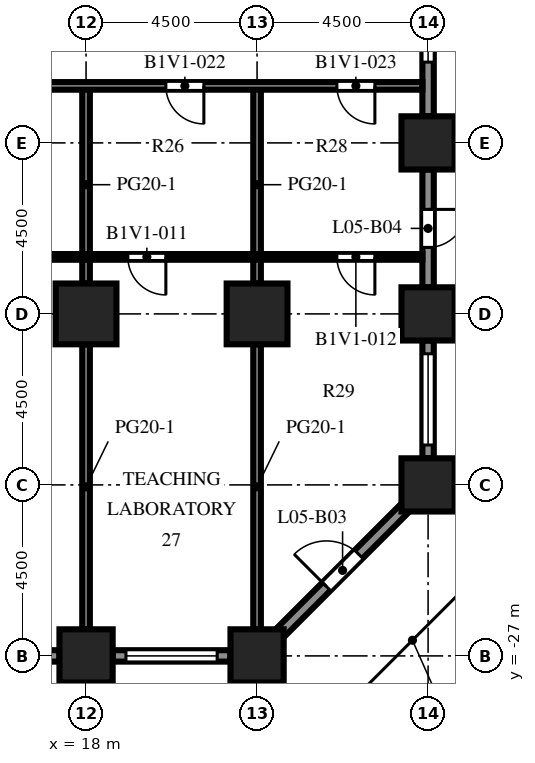
"""IFC4 building model, lengths in metres.
Left out: names, types, materials, properties, quantities, classifications, styles, units other than length and angle.
Written with IfcOpenShell. Run it as: python <this file> out.ifc"""

import sys

from ifc_helpers import new_model, si_unit, direction, frame, frame_2d, origin, origin_2d, place, context, subcontext, project, spatial, rectangle, extrude, element, fill, save


model = new_model("IFC4")
c1 = context("Model", 3, precision=1e-05, world=origin(), true_north=direction((0.0, 1.0)))
c2 = subcontext(c1, "Body", "Model", "MODEL_VIEW")
j1 = project(units=[si_unit("LENGTHUNIT", "METRE"), si_unit("PLANEANGLEUNIT", "RADIAN")], contexts=[c1])
p1 = place(None, origin())
s1 = spatial("IfcSite", under=j1, at=p1, CompositionType="ELEMENT")
p2 = place(p1, origin())
s2 = spatial("IfcBuilding", under=s1, at=p2, CompositionType="ELEMENT")
p3 = place(p2, frame((0.0, 0.0, 23.6)))
s3 = spatial("IfcBuildingStorey", under=s2, at=p3, CompositionType="ELEMENT", Elevation=23.6)
for number, where, z_axis, x_axis in (
    (1, (18.0, -27.0, 0.0), (0.0, 0.0, 1.0), (1.0, 0.0, 0.0)),
    (2, (22.5, -27.0, 0.0), (0.0, 0.0, 1.0), (1.0, 0.0, 0.0)),
    (3, (27.0, -22.5, 0.0), (0.0, 0.0, 1.0), (1.0, 0.0, 0.0)),
    (4, (27.0, -18.0, 0.0), (0.0, 0.0, 1.0), (1.0, 0.0, 0.0)),
    (5, (27.0, -13.5, 0.0), (0.0, 0.0, 1.0), (1.0, 0.0, 0.0)),
):
    element("IfcColumn", number, at=place(p3, frame(where, z_axis=z_axis, x_axis=x_axis)), inside=s3, PredefinedType="COLUMN", context=c2, shape_type="SweptSolid", body=[
        extrude(rectangle(XDim=1.4, YDim=1.4, at=origin_2d()), origin(), (0.0, 0.0, 1.0), 4.1),
    ])
for number, where, z_axis, x_axis in (
    (6, (18.0, -18.0, 0.0), (0.0, 0.0, 1.0), (1.0, 0.0, 0.0)),
    (7, (22.5, -18.0, 0.0), (0.0, 0.0, 1.0), (1.0, 0.0, 0.0)),
):
    element("IfcColumn", number, at=place(p3, frame(where, z_axis=z_axis, x_axis=x_axis)), inside=s3, PredefinedType="COLUMN", context=c2, shape_type="SweptSolid", body=[
        extrude(rectangle(XDim=1.6, YDim=1.6, at=origin_2d()), origin(), (0.0, 0.0, 1.0), 4.1),
    ])
p4 = place(p3, frame((17.3, -27.0, 0.0), z_axis=(0.0, 0.0, 1.0), x_axis=(-1.0, 0.0, 0.0)))
e8 = element("IfcWall", 8, at=p4, inside=s3, PredefinedType="SOLIDWALL", context=c2, shape_type="SweptSolid", body=[
    extrude(rectangle(XDim=3.1, YDim=0.3, at=frame_2d((1.55, 0.0))), origin(), (0.0, 0.0, 1.0), 2.75),
])
p5 = place(p4, frame((1.05, 0.0, 0.0)))
e9 = element("IfcOpeningElement", 9, at=p5, cuts=e8, PredefinedType="OPENING", context=c2, shape_type="SweptSolid", body=[
    extrude(rectangle(XDim=1.0, YDim=2.2, at=frame_2d((0.5, 1.1))), frame((0.0, 0.16, 0.0), z_axis=(0.0, -1.0, 0.0), x_axis=(1.0, 0.0, 0.0)), (0.0, 0.0, 1.0), 0.32),
])
p6 = place(p3, frame((21.8, -27.0, 0.0), z_axis=(0.0, 0.0, 1.0), x_axis=(-1.0, 0.0, 0.0)))
e10 = element("IfcWall", 10, at=p6, inside=s3, PredefinedType="SOLIDWALL", context=c2, shape_type="SweptSolid", body=[
    extrude(rectangle(XDim=3.1, YDim=0.3, at=frame_2d((1.55, 0.0))), origin(), (0.0, 0.0, 1.0), 2.75),
])
p7 = place(p6, frame((0.35, 0.0, 0.8)))
e11 = element("IfcOpeningElement", 11, at=p7, cuts=e10, PredefinedType="OPENING", context=c2, shape_type="SweptSolid", body=[
    extrude(rectangle(XDim=2.4, YDim=1.7, at=frame_2d((1.2, 0.85))), frame((0.0, 0.16, 0.0), z_axis=(0.0, -1.0, 0.0), x_axis=(1.0, 0.0, 0.0)), (0.0, 0.0, 1.0), 0.32),
])
p8 = place(p3, frame((26.406, -23.094, 0.0), z_axis=(0.0, 0.0, 1.0), x_axis=(-0.707106781187, -0.707106781187, 0.0)))
e12 = element("IfcWall", 12, at=p8, inside=s3, PredefinedType="SOLIDWALL", context=c2, shape_type="SweptSolid", body=[
    extrude(rectangle(XDim=4.684, YDim=0.3, at=frame_2d((2.342, 0.0))), origin(), (0.0, 0.0, 1.0), 2.75),
])
p9 = place(p8, frame((1.742, 0.0, 0.0)))
e13 = element("IfcOpeningElement", 13, at=p9, cuts=e12, PredefinedType="OPENING", context=c2, shape_type="SweptSolid", body=[
    extrude(rectangle(XDim=1.2, YDim=2.2, at=frame_2d((0.6, 1.1))), frame((0.0, 0.16, 0.0), z_axis=(0.0, -1.0, 0.0), x_axis=(1.0, 0.0, 0.0)), (0.0, 0.0, 1.0), 0.32),
])
p10 = place(p3, frame((27.0, -18.7, 0.0), z_axis=(0.0, 0.0, 1.0), x_axis=(0.0, -1.0, 0.0)))
e14 = element("IfcWall", 14, at=p10, inside=s3, PredefinedType="SOLIDWALL", context=c2, shape_type="SweptSolid", body=[
    extrude(rectangle(XDim=3.1, YDim=0.3, at=frame_2d((1.55, 0.0))), origin(), (0.0, 0.0, 1.0), 2.75),
])
p11 = place(p10, frame((0.35, 0.0, 0.8)))
e15 = element("IfcOpeningElement", 15, at=p11, cuts=e14, PredefinedType="OPENING", context=c2, shape_type="SweptSolid", body=[
    extrude(rectangle(XDim=2.4, YDim=1.7, at=frame_2d((1.2, 0.85))), frame((0.0, 0.16, 0.0), z_axis=(0.0, -1.0, 0.0), x_axis=(1.0, 0.0, 0.0)), (0.0, 0.0, 1.0), 0.32),
])
p12 = place(p3, frame((27.0, -14.2, 0.0), z_axis=(0.0, 0.0, 1.0), x_axis=(0.0, -1.0, 0.0)))
e16 = element("IfcWall", 16, at=p12, inside=s3, PredefinedType="SOLIDWALL", context=c2, shape_type="SweptSolid", body=[
    extrude(rectangle(XDim=3.1, YDim=0.3, at=frame_2d((1.55, 0.0))), origin(), (0.0, 0.0, 1.0), 2.75),
])
p13 = place(p12, frame((1.05, 0.0, 0.0)))
e17 = element("IfcOpeningElement", 17, at=p13, cuts=e16, PredefinedType="OPENING", context=c2, shape_type="SweptSolid", body=[
    extrude(rectangle(XDim=1.0, YDim=2.2, at=frame_2d((0.5, 1.1))), frame((0.0, 0.16, 0.0), z_axis=(0.0, -1.0, 0.0), x_axis=(1.0, 0.0, 0.0)), (0.0, 0.0, 1.0), 0.32),
])
p14 = place(p3, frame((27.0, -9.7, 0.0), z_axis=(0.0, 0.0, 1.0), x_axis=(0.0, -1.0, 0.0)))
e18 = element("IfcWall", 18, at=p14, inside=s3, PredefinedType="SOLIDWALL", context=c2, shape_type="SweptSolid", body=[
    extrude(rectangle(XDim=3.1, YDim=0.3, at=frame_2d((1.55, 0.0))), origin(), (0.0, 0.0, 1.0), 2.75),
])
p15 = place(p14, frame((0.475, 0.0, 0.8)))
e19 = element("IfcOpeningElement", 19, at=p15, cuts=e18, PredefinedType="OPENING", context=c2, shape_type="SweptSolid", body=[
    extrude(rectangle(XDim=1.2, YDim=1.7, at=frame_2d((0.6, 0.85))), frame((0.0, 0.16, 0.0), z_axis=(0.0, -1.0, 0.0), x_axis=(1.0, 0.0, 0.0)), (0.0, 0.0, 1.0), 0.32),
])
p16 = place(p3, frame((18.0, -26.3, 0.0), z_axis=(0.0, 0.0, 1.0), x_axis=(0.0, 1.0, 0.0)))
e20 = element("IfcWall", 20, at=p16, inside=s3, PredefinedType="PARTITIONING", context=c2, shape_type="SweptSolid", body=[
    extrude(rectangle(XDim=7.5, YDim=0.2, at=frame_2d((3.75, 0.0))), origin(), (0.0, 0.0, 1.0), 3.65),
])
p17 = place(p3, frame((18.0, -17.2, 0.0), z_axis=(0.0, 0.0, 1.0), x_axis=(0.0, 1.0, 0.0)))
e21 = element("IfcWall", 21, at=p17, inside=s3, PredefinedType="PARTITIONING", context=c2, shape_type="SweptSolid", body=[
    extrude(rectangle(XDim=5.2, YDim=0.2, at=frame_2d((2.6, 0.0))), origin(), (0.0, 0.0, 1.0), 3.65),
])
p18 = place(p3, frame((22.5, -26.3, 0.0), z_axis=(0.0, 0.0, 1.0), x_axis=(0.0, 1.0, 0.0)))
e22 = element("IfcWall", 22, at=p18, inside=s3, PredefinedType="PARTITIONING", context=c2, shape_type="SweptSolid", body=[
    extrude(rectangle(XDim=7.5, YDim=0.2, at=frame_2d((3.75, 0.0))), origin(), (0.0, 0.0, 1.0), 3.65),
])
p19 = place(p3, frame((22.5, -17.2, 0.0), z_axis=(0.0, 0.0, 1.0), x_axis=(0.0, 1.0, 0.0)))
e23 = element("IfcWall", 23, at=p19, inside=s3, PredefinedType="PARTITIONING", context=c2, shape_type="SweptSolid", body=[
    extrude(rectangle(XDim=5.2, YDim=0.2, at=frame_2d((2.6, 0.0))), origin(), (0.0, 0.0, 1.0), 3.65),
])
p20 = place(p3, frame((26.85, -16.5, 0.0), z_axis=(0.0, 0.0, 1.0), x_axis=(-1.0, 0.0, 0.0)))
e24 = element("IfcWall", 24, at=p20, inside=s3, PredefinedType="PARTITIONING", context=c2, shape_type="SweptSolid", body=[
    extrude(rectangle(XDim=53.7, YDim=0.15, at=frame_2d((26.85, 0.0))), origin(), (0.0, 0.0, 1.0), 3.65),
])
p21 = place(p20, frame((50.75, 0.0, 0.0)))
e25 = element("IfcOpeningElement", 25, at=p21, cuts=e24, PredefinedType="OPENING", context=c2, shape_type="SweptSolid", body=[
    extrude(rectangle(XDim=1.0, YDim=2.1, at=frame_2d((0.5, 1.05))), frame((0.0, 0.085, 0.0), z_axis=(0.0, -1.0, 0.0), x_axis=(1.0, 0.0, 0.0)), (0.0, 0.0, 1.0), 0.17),
])
p22 = place(p20, frame((45.75, 0.0, 0.0)))
e26 = element("IfcOpeningElement", 26, at=p22, cuts=e24, PredefinedType="OPENING", context=c2, shape_type="SweptSolid", body=[
    extrude(rectangle(XDim=1.0, YDim=2.1, at=frame_2d((0.5, 1.05))), frame((0.0, 0.085, 0.0), z_axis=(0.0, -1.0, 0.0), x_axis=(1.0, 0.0, 0.0)), (0.0, 0.0, 1.0), 0.17),
])
p23 = place(p20, frame((37.75, 0.0, 0.0)))
e27 = element("IfcOpeningElement", 27, at=p23, cuts=e24, PredefinedType="OPENING", context=c2, shape_type="SweptSolid", body=[
    extrude(rectangle(XDim=1.0, YDim=2.1, at=frame_2d((0.5, 1.05))), frame((0.0, 0.085, 0.0), z_axis=(0.0, -1.0, 0.0), x_axis=(1.0, 0.0, 0.0)), (0.0, 0.0, 1.0), 0.17),
])
p24 = place(p20, frame((28.25, 0.0, 0.0)))
e28 = element("IfcOpeningElement", 28, at=p24, cuts=e24, PredefinedType="OPENING", context=c2, shape_type="SweptSolid", body=[
    extrude(rectangle(XDim=1.0, YDim=2.1, at=frame_2d((0.5, 1.05))), frame((0.0, 0.085, 0.0), z_axis=(0.0, -1.0, 0.0), x_axis=(1.0, 0.0, 0.0)), (0.0, 0.0, 1.0), 0.17),
])
p25 = place(p20, frame((19.75, 0.0, 0.0)))
e29 = element("IfcOpeningElement", 29, at=p25, cuts=e24, PredefinedType="OPENING", context=c2, shape_type="SweptSolid", body=[
    extrude(rectangle(XDim=1.0, YDim=2.1, at=frame_2d((0.5, 1.05))), frame((0.0, 0.085, 0.0), z_axis=(0.0, -1.0, 0.0), x_axis=(1.0, 0.0, 0.0)), (0.0, 0.0, 1.0), 0.17),
])
p26 = place(p20, frame((13.5, 0.0, 0.0)))
e30 = element("IfcOpeningElement", 30, at=p26, cuts=e24, PredefinedType="OPENING", context=c2, shape_type="SweptSolid", body=[
    extrude(rectangle(XDim=1.0, YDim=2.1, at=frame_2d((0.5, 1.05))), frame((0.0, 0.085, 0.0), z_axis=(0.0, -1.0, 0.0), x_axis=(1.0, 0.0, 0.0)), (0.0, 0.0, 1.0), 0.17),
])
p27 = place(p20, frame((6.75, 0.0, 0.0)))
e31 = element("IfcOpeningElement", 31, at=p27, cuts=e24, PredefinedType="OPENING", context=c2, shape_type="SweptSolid", body=[
    extrude(rectangle(XDim=1.0, YDim=2.1, at=frame_2d((0.5, 1.05))), frame((0.0, 0.085, 0.0), z_axis=(0.0, -1.0, 0.0), x_axis=(1.0, 0.0, 0.0)), (0.0, 0.0, 1.0), 0.17),
])
p28 = place(p20, frame((1.25, 0.0, 0.0)))
e32 = element("IfcOpeningElement", 32, at=p28, cuts=e24, PredefinedType="OPENING", context=c2, shape_type="SweptSolid", body=[
    extrude(rectangle(XDim=1.0, YDim=2.1, at=frame_2d((0.5, 1.05))), frame((0.0, 0.085, 0.0), z_axis=(0.0, -1.0, 0.0), x_axis=(1.0, 0.0, 0.0)), (0.0, 0.0, 1.0), 0.17),
])
p29 = place(p3, frame((26.85, -12.0, 0.0), z_axis=(0.0, 0.0, 1.0), x_axis=(-1.0, 0.0, 0.0)))
e33 = element("IfcWall", 33, at=p29, inside=s3, PredefinedType="PARTITIONING", context=c2, shape_type="SweptSolid", body=[
    extrude(rectangle(XDim=53.7, YDim=0.2, at=frame_2d((26.85, 0.0))), origin(), (0.0, 0.0, 1.0), 3.65),
])
p30 = place(p29, frame((51.5, 0.0, 0.0)))
e34 = element("IfcOpeningElement", 34, at=p30, cuts=e33, PredefinedType="OPENING", context=c2, shape_type="SweptSolid", body=[
    extrude(rectangle(XDim=1.0, YDim=2.1, at=frame_2d((0.5, 1.05))), frame((0.0, 0.11, 0.0), z_axis=(0.0, -1.0, 0.0), x_axis=(1.0, 0.0, 0.0)), (0.0, 0.0, 1.0), 0.22),
])
p31 = place(p29, frame((44.0, 0.0, 0.0)))
e35 = element("IfcOpeningElement", 35, at=p31, cuts=e33, PredefinedType="OPENING", context=c2, shape_type="SweptSolid", body=[
    extrude(rectangle(XDim=1.0, YDim=2.1, at=frame_2d((0.5, 1.05))), frame((0.0, 0.11, 0.0), z_axis=(0.0, -1.0, 0.0), x_axis=(1.0, 0.0, 0.0)), (0.0, 0.0, 1.0), 0.22),
])
p32 = place(p29, frame((37.25, 0.0, 0.0)))
e36 = element("IfcOpeningElement", 36, at=p32, cuts=e33, PredefinedType="OPENING", context=c2, shape_type="SweptSolid", body=[
    extrude(rectangle(XDim=1.0, YDim=2.1, at=frame_2d((0.5, 1.05))), frame((0.0, 0.11, 0.0), z_axis=(0.0, -1.0, 0.0), x_axis=(1.0, 0.0, 0.0)), (0.0, 0.0, 1.0), 0.22),
])
p33 = place(p29, frame((30.5, 0.0, 0.0)))
e37 = element("IfcOpeningElement", 37, at=p33, cuts=e33, PredefinedType="OPENING", context=c2, shape_type="SweptSolid", body=[
    extrude(rectangle(XDim=1.0, YDim=2.1, at=frame_2d((0.5, 1.05))), frame((0.0, 0.11, 0.0), z_axis=(0.0, -1.0, 0.0), x_axis=(1.0, 0.0, 0.0)), (0.0, 0.0, 1.0), 0.22),
])
p34 = place(p29, frame((20.0, 0.0, 0.0)))
e38 = element("IfcOpeningElement", 38, at=p34, cuts=e33, PredefinedType="OPENING", context=c2, shape_type="SweptSolid", body=[
    extrude(rectangle(XDim=1.0, YDim=2.1, at=frame_2d((0.5, 1.05))), frame((0.0, 0.11, 0.0), z_axis=(0.0, -1.0, 0.0), x_axis=(1.0, 0.0, 0.0)), (0.0, 0.0, 1.0), 0.22),
])
p35 = place(p29, frame((13.0, 0.0, 0.0)))
e39 = element("IfcOpeningElement", 39, at=p35, cuts=e33, PredefinedType="OPENING", context=c2, shape_type="SweptSolid", body=[
    extrude(rectangle(XDim=1.0, YDim=2.1, at=frame_2d((0.5, 1.05))), frame((0.0, 0.11, 0.0), z_axis=(0.0, -1.0, 0.0), x_axis=(1.0, 0.0, 0.0)), (0.0, 0.0, 1.0), 0.22),
])
p36 = place(p29, frame((5.75, 0.0, 0.0)))
e40 = element("IfcOpeningElement", 40, at=p36, cuts=e33, PredefinedType="OPENING", context=c2, shape_type="SweptSolid", body=[
    extrude(rectangle(XDim=1.0, YDim=2.1, at=frame_2d((0.5, 1.05))), frame((0.0, 0.11, 0.0), z_axis=(0.0, -1.0, 0.0), x_axis=(1.0, 0.0, 0.0)), (0.0, 0.0, 1.0), 0.22),
])
p37 = place(p29, frame((1.25, 0.0, 0.0)))
e41 = element("IfcOpeningElement", 41, at=p37, cuts=e33, PredefinedType="OPENING", context=c2, shape_type="SweptSolid", body=[
    extrude(rectangle(XDim=1.0, YDim=2.1, at=frame_2d((0.5, 1.05))), frame((0.0, 0.11, 0.0), z_axis=(0.0, -1.0, 0.0), x_axis=(1.0, 0.0, 0.0)), (0.0, 0.0, 1.0), 0.22),
])
p38 = place(p7, origin())
e42 = element("IfcWindow", 42, at=p38, inside=s3, PartitioningType="SINGLE_PANEL", PredefinedType="WINDOW", context=c2, shape_type="SweptSolid", body=[
    extrude(rectangle(XDim=2.4, YDim=1.7, at=frame_2d((1.2, 0.85))), frame((0.0, 0.03, 0.0), z_axis=(0.0, -1.0, 0.0), x_axis=(1.0, 0.0, 0.0)), (0.0, 0.0, 1.0), 0.06),
])
fill(e11, e42)
p39 = place(p9, origin())
e43 = element("IfcDoor", 43, at=p39, inside=s3, OperationType="SINGLE_SWING_RIGHT", PredefinedType="DOOR", context=c2, shape_type="SweptSolid", body=[
    extrude(rectangle(XDim=1.2, YDim=2.2, at=frame_2d((0.6, 1.1))), frame((0.0, 0.025, 0.0), z_axis=(0.0, -1.0, 0.0), x_axis=(1.0, 0.0, 0.0)), (0.0, 0.0, 1.0), 0.05),
])
fill(e13, e43)
p40 = place(p11, origin())
e44 = element("IfcWindow", 44, at=p40, inside=s3, PartitioningType="SINGLE_PANEL", PredefinedType="WINDOW", context=c2, shape_type="SweptSolid", body=[
    extrude(rectangle(XDim=2.4, YDim=1.7, at=frame_2d((1.2, 0.85))), frame((0.0, 0.03, 0.0), z_axis=(0.0, -1.0, 0.0), x_axis=(1.0, 0.0, 0.0)), (0.0, 0.0, 1.0), 0.06),
])
fill(e15, e44)
p41 = place(p13, origin())
e45 = element("IfcDoor", 45, at=p41, inside=s3, OperationType="SINGLE_SWING_LEFT", PredefinedType="DOOR", context=c2, shape_type="SweptSolid", body=[
    extrude(rectangle(XDim=1.0, YDim=2.2, at=frame_2d((0.5, 1.1))), frame((0.0, 0.025, 0.0), z_axis=(0.0, -1.0, 0.0), x_axis=(1.0, 0.0, 0.0)), (0.0, 0.0, 1.0), 0.05),
])
fill(e17, e45)
p42 = place(p15, origin())
e46 = element("IfcWindow", 46, at=p42, inside=s3, PartitioningType="SINGLE_PANEL", PredefinedType="WINDOW", context=c2, shape_type="SweptSolid", body=[
    extrude(rectangle(XDim=1.2, YDim=1.7, at=frame_2d((0.6, 0.85))), frame((0.0, 0.03, 0.0), z_axis=(0.0, -1.0, 0.0), x_axis=(1.0, 0.0, 0.0)), (0.0, 0.0, 1.0), 0.06),
])
fill(e19, e46)
p43 = place(p27, origin())
e47 = element("IfcDoor", 47, at=p43, inside=s3, OperationType="SINGLE_SWING_LEFT", PredefinedType="DOOR", context=c2, shape_type="SweptSolid", body=[
    extrude(rectangle(XDim=1.0, YDim=2.1, at=frame_2d((0.5, 1.05))), frame((0.0, 0.025, 0.0), z_axis=(0.0, -1.0, 0.0), x_axis=(1.0, 0.0, 0.0)), (0.0, 0.0, 1.0), 0.05),
])
fill(e31, e47)
p44 = place(p28, origin())
e48 = element("IfcDoor", 48, at=p44, inside=s3, OperationType="SINGLE_SWING_LEFT", PredefinedType="DOOR", context=c2, shape_type="SweptSolid", body=[
    extrude(rectangle(XDim=1.0, YDim=2.1, at=frame_2d((0.5, 1.05))), frame((0.0, 0.025, 0.0), z_axis=(0.0, -1.0, 0.0), x_axis=(1.0, 0.0, 0.0)), (0.0, 0.0, 1.0), 0.05),
])
fill(e32, e48)
p45 = place(p36, origin())
e49 = element("IfcDoor", 49, at=p45, inside=s3, OperationType="SINGLE_SWING_LEFT", PredefinedType="DOOR", context=c2, shape_type="SweptSolid", body=[
    extrude(rectangle(XDim=1.0, YDim=2.1, at=frame_2d((0.5, 1.05))), frame((0.0, 0.025, 0.0), z_axis=(0.0, -1.0, 0.0), x_axis=(1.0, 0.0, 0.0)), (0.0, 0.0, 1.0), 0.05),
])
fill(e40, e49)
p46 = place(p37, origin())
e50 = element("IfcDoor", 50, at=p46, inside=s3, OperationType="SINGLE_SWING_LEFT", PredefinedType="DOOR", context=c2, shape_type="SweptSolid", body=[
    extrude(rectangle(XDim=1.0, YDim=2.1, at=frame_2d((0.5, 1.05))), frame((0.0, 0.025, 0.0), z_axis=(0.0, -1.0, 0.0), x_axis=(1.0, 0.0, 0.0)), (0.0, 0.0, 1.0), 0.05),
])
fill(e41, e50)
save(model, sys.argv[1])
